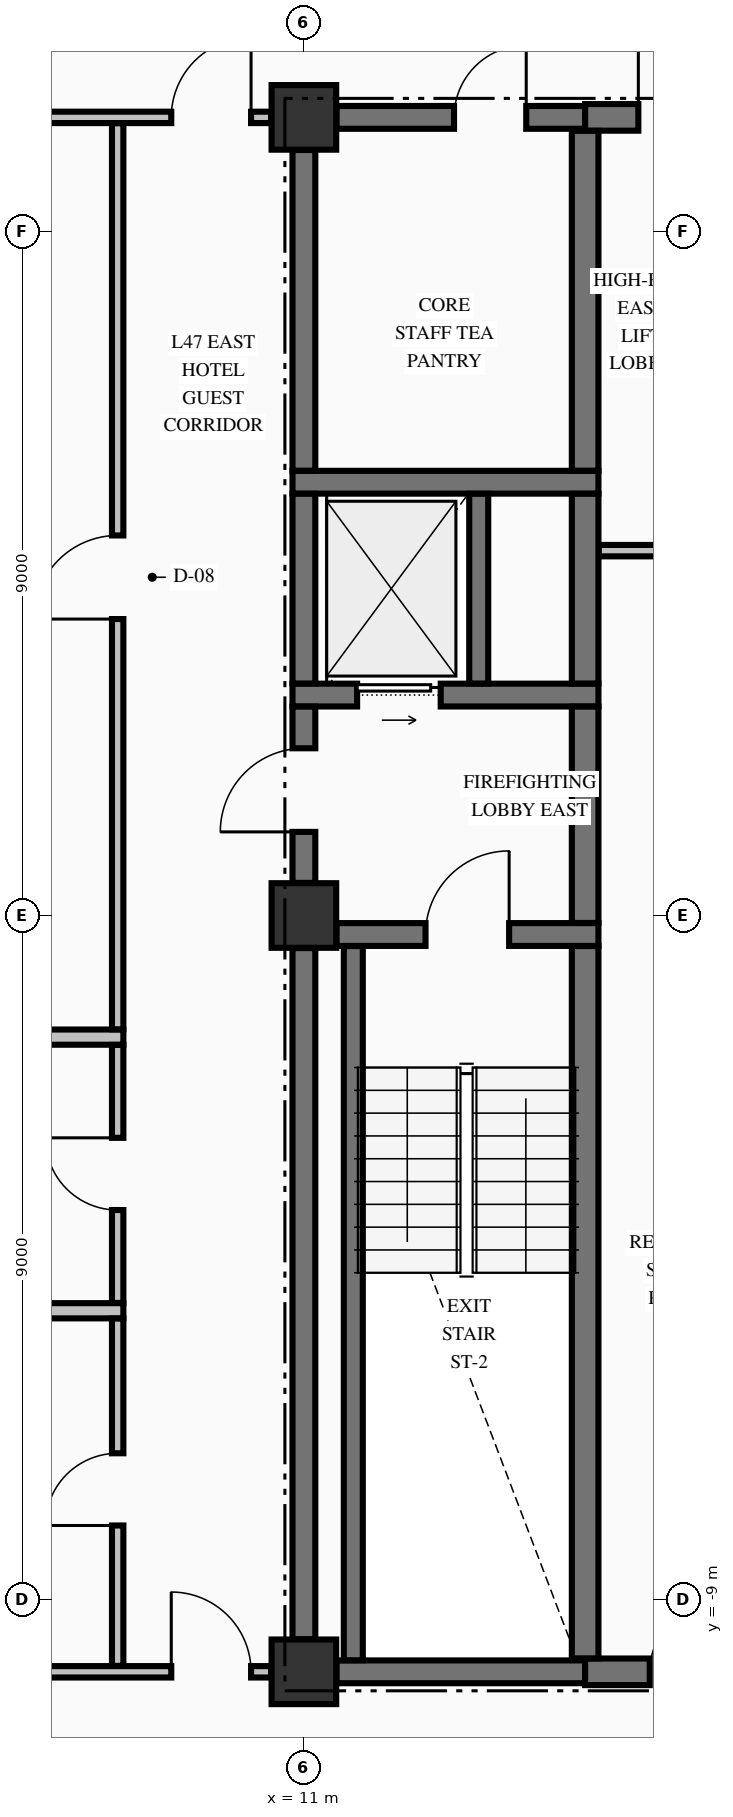
"""IFC4 building model, lengths in metres.
Left out: names, types, materials, properties, quantities, classifications, styles, units other than length and angle.
Written with IfcOpenShell. Run it as: python <this file> out.ifc"""

import sys

from ifc_helpers import new_model, si_unit, direction, frame, frame_2d, origin, origin_2d, place, context, subcontext, project, spatial, rectangle, extrude, element, fill, save


model = new_model("IFC4")
c1 = context("Model", 3, precision=1e-05, world=origin(), true_north=direction((0.0, 1.0)))
c2 = subcontext(c1, "Body", "Model", "MODEL_VIEW")
j1 = project(units=[si_unit("LENGTHUNIT", "METRE"), si_unit("PLANEANGLEUNIT", "RADIAN")], contexts=[c1])
p1 = place(None, origin())
s1 = spatial("IfcSite", under=j1, at=p1, CompositionType="ELEMENT")
p2 = place(p1, origin())
s2 = spatial("IfcBuilding", under=s1, at=p2, CompositionType="ELEMENT")
p3 = place(p2, frame((0.0, 0.0, 183.06)))
s3 = spatial("IfcBuildingStorey", under=s2, at=p3, CompositionType="ELEMENT", Elevation=183.06)
for number, where, z_axis, x_axis in (
    (1, (11.0, -9.95, -0.25), (0.0, 0.0, 1.0), (1.0, 0.0, 0.0)),
    (2, (11.0, 0.0, -0.25), (0.0, 0.0, 1.0), (1.0, 0.0, 0.0)),
    (3, (11.0, 10.5, -0.25), (0.0, 0.0, 1.0), (1.0, 0.0, 0.0)),
):
    element("IfcColumn", number, at=place(p3, frame(where, z_axis=z_axis, x_axis=x_axis)), inside=s3, PredefinedType="COLUMN", context=c2, shape_type="SweptSolid", body=[
        extrude(rectangle(XDim=0.85, YDim=0.85, at=origin_2d()), origin(), (0.0, 0.0, 1.0), 3.225),
    ])
p4 = place(p3, frame((11.429, -9.95, 0.0), z_axis=(0.0, 0.0, 1.0), x_axis=(1.0, 0.0, 0.0)))
e4 = element("IfcWall", 4, at=p4, inside=s3, PredefinedType="SHEAR", context=c2, shape_type="SweptSolid", body=[
    extrude(rectangle(XDim=3.271, YDim=0.3, at=frame_2d((1.635, 0.0))), origin(), (0.0, 0.0, 1.0), 2.975),
])
p5 = place(p3, frame((14.7, -9.95, 0.0), z_axis=(0.0, 0.0, 1.0), x_axis=(1.0, 0.0, 0.0)))
e5 = element("IfcWall", 5, at=p5, inside=s3, PredefinedType="SHEAR", context=c2, shape_type="SweptSolid", body=[
    extrude(rectangle(XDim=4.871, YDim=0.35, at=frame_2d((2.436, 0.0))), origin(), (0.0, 0.0, 1.0), 2.975),
])
p6 = place(p5, frame((0.85, 0.0, 0.0)))
e6 = element("IfcOpeningElement", 6, at=p6, cuts=e5, PredefinedType="OPENING", context=c2, shape_type="SweptSolid", body=[
    extrude(rectangle(XDim=0.9, YDim=2.15, at=frame_2d((0.45, 1.075))), frame((0.0, 0.185, 0.0), z_axis=(0.0, -1.0, 0.0), x_axis=(1.0, 0.0, 0.0)), (0.0, 0.0, 1.0), 0.37),
])
p7 = place(p5, frame((3.4, 0.0, 0.0)))
e7 = element("IfcOpeningElement", 7, at=p7, cuts=e5, PredefinedType="OPENING", context=c2, shape_type="SweptSolid", body=[
    extrude(rectangle(XDim=0.9, YDim=2.15, at=frame_2d((0.45, 1.075))), frame((0.0, 0.185, 0.0), z_axis=(0.0, -1.0, 0.0), x_axis=(1.0, 0.0, 0.0)), (0.0, 0.0, 1.0), 0.37),
])
p8 = place(p3, frame((11.429, -0.25, 0.0), z_axis=(0.0, 0.0, 1.0), x_axis=(1.0, 0.0, 0.0)))
e8 = element("IfcWall", 8, at=p8, inside=s3, PredefinedType="SHEAR", context=c2, shape_type="SweptSolid", body=[
    extrude(rectangle(XDim=3.446, YDim=0.3, at=frame_2d((1.723, 0.0))), origin(), (0.0, 0.0, 1.0), 2.975),
])
p9 = place(p8, frame((1.171, 0.0, 0.0)))
e9 = element("IfcOpeningElement", 9, at=p9, cuts=e8, PredefinedType="OPENING", context=c2, shape_type="SweptSolid", body=[
    extrude(rectangle(XDim=1.1, YDim=2.15, at=frame_2d((0.55, 1.075))), frame((0.0, 0.16, 0.0), z_axis=(0.0, -1.0, 0.0), x_axis=(1.0, 0.0, 0.0)), (0.0, 0.0, 1.0), 0.32),
])
p10 = place(p3, frame((10.85, 2.9, 0.0), z_axis=(0.0, 0.0, 1.0), x_axis=(1.0, 0.0, 0.0)))
e10 = element("IfcWall", 10, at=p10, inside=s3, PredefinedType="SHEAR", context=c2, shape_type="SweptSolid", body=[
    extrude(rectangle(XDim=4.025, YDim=0.3, at=frame_2d((2.012, 0.0))), origin(), (0.0, 0.0, 1.0), 2.975),
])
p11 = place(p10, frame((0.85, 0.0, 0.0)))
e11 = element("IfcOpeningElement", 11, at=p11, cuts=e10, PredefinedType="OPENING", context=c2, shape_type="SweptSolid", body=[
    extrude(rectangle(XDim=1.1, YDim=2.2, at=frame_2d((0.55, 1.1))), frame((0.0, 0.16, 0.0), z_axis=(0.0, -1.0, 0.0), x_axis=(1.0, 0.0, 0.0)), (0.0, 0.0, 1.0), 0.32),
])
p12 = place(p3, frame((10.85, 5.7, 0.0), z_axis=(0.0, 0.0, 1.0), x_axis=(1.0, 0.0, 0.0)))
e12 = element("IfcWall", 12, at=p12, inside=s3, PredefinedType="SHEAR", context=c2, shape_type="SweptSolid", body=[
    extrude(rectangle(XDim=4.025, YDim=0.3, at=frame_2d((2.012, 0.0))), origin(), (0.0, 0.0, 1.0), 2.975),
])
p13 = place(p3, frame((11.429, 10.5, 0.0), z_axis=(0.0, 0.0, 1.0), x_axis=(1.0, 0.0, 0.0)))
e13 = element("IfcWall", 13, at=p13, inside=s3, PredefinedType="SHEAR", context=c2, shape_type="SweptSolid", body=[
    extrude(rectangle(XDim=3.271, YDim=0.3, at=frame_2d((1.635, 0.0))), origin(), (0.0, 0.0, 1.0), 2.975),
])
p14 = place(p13, frame((1.546, 0.0, 0.0)))
e14 = element("IfcOpeningElement", 14, at=p14, cuts=e13, PredefinedType="OPENING", context=c2, shape_type="SweptSolid", body=[
    extrude(rectangle(XDim=0.95, YDim=2.02, at=frame_2d((0.475, 1.01))), frame((0.0, 0.16, 0.0), z_axis=(0.0, -1.0, 0.0), x_axis=(1.0, 0.0, 0.0)), (0.0, 0.0, 1.0), 0.32),
])
p15 = place(p3, frame((14.7, 10.5, 0.0), z_axis=(0.0, 0.0, 1.0), x_axis=(1.0, 0.0, 0.0)))
e15 = element("IfcWall", 15, at=p15, inside=s3, PredefinedType="SHEAR", context=c2, shape_type="SweptSolid", body=[
    extrude(rectangle(XDim=4.871, YDim=0.35, at=frame_2d((2.436, 0.0))), origin(), (0.0, 0.0, 1.0), 2.975),
])
p16 = place(p15, frame((0.7, 0.0, 0.0)))
e16 = element("IfcOpeningElement", 16, at=p16, cuts=e15, PredefinedType="OPENING", context=c2, shape_type="SweptSolid", body=[
    extrude(rectangle(XDim=0.95, YDim=2.02, at=frame_2d((0.475, 1.01))), frame((0.0, 0.185, 0.0), z_axis=(0.0, -1.0, 0.0), x_axis=(1.0, 0.0, 0.0)), (0.0, 0.0, 1.0), 0.37),
])
p17 = place(p3, frame((-10.569, -9.95, 0.0), z_axis=(0.0, 0.0, 1.0), x_axis=(1.0, 0.0, 0.0)))
e17 = element("IfcWall", 17, at=p17, inside=s3, PredefinedType="PARTITIONING", context=c2, shape_type="SweptSolid", body=[
    extrude(rectangle(XDim=21.138, YDim=0.15, at=frame_2d((10.569, 0.0))), origin(), (0.0, 0.0, 1.0), 2.975),
])
p18 = place(p17, frame((0.264, 0.0, 0.0)))
e18 = element("IfcOpeningElement", 18, at=p18, cuts=e17, PredefinedType="OPENING", context=c2, shape_type="SweptSolid", body=[
    extrude(rectangle(XDim=1.05, YDim=2.15, at=frame_2d((0.525, 1.075))), frame((0.0, 0.085, 0.0), z_axis=(0.0, -1.0, 0.0), x_axis=(1.0, 0.0, 0.0)), (0.0, 0.0, 1.0), 0.17),
])
p19 = place(p17, frame((19.824, 0.0, 0.0)))
e19 = element("IfcOpeningElement", 19, at=p19, cuts=e17, PredefinedType="OPENING", context=c2, shape_type="SweptSolid", body=[
    extrude(rectangle(XDim=1.05, YDim=2.15, at=frame_2d((0.525, 1.075))), frame((0.0, 0.085, 0.0), z_axis=(0.0, -1.0, 0.0), x_axis=(1.0, 0.0, 0.0)), (0.0, 0.0, 1.0), 0.17),
])
p20 = place(p17, frame((12.874, 0.0, 0.0)))
e20 = element("IfcOpeningElement", 20, at=p20, cuts=e17, PredefinedType="OPENING", context=c2, shape_type="SweptSolid", body=[
    extrude(rectangle(XDim=0.95, YDim=2.15, at=frame_2d((0.475, 1.075))), frame((0.0, 0.085, 0.0), z_axis=(0.0, -1.0, 0.0), x_axis=(1.0, 0.0, 0.0)), (0.0, 0.0, 1.0), 0.17),
])
for number, where, z_axis, x_axis in (
    (21, (-0.1, -5.2, 0.0), (0.0, 0.0, 1.0), (1.0, 0.0, 0.0)),
    (22, (-0.1, -1.6, 0.0), (0.0, 0.0, 1.0), (1.0, 0.0, 0.0)),
):
    element("IfcWall", number, at=place(p3, frame(where, z_axis=z_axis, x_axis=x_axis)), inside=s3, PredefinedType="PARTITIONING", context=c2, shape_type="SweptSolid", body=[
        extrude(rectangle(XDim=8.725, YDim=0.2, at=frame_2d((4.363, 0.0))), origin(), (0.0, 0.0, 1.0), 2.975),
    ])
p21 = place(p3, frame((14.878, 4.8, 0.0), z_axis=(0.0, 0.0, 1.0), x_axis=(1.0, 0.0, 0.0)))
e23 = element("IfcWall", 23, at=p21, inside=s3, PredefinedType="PARTITIONING", context=c2, shape_type="SweptSolid", body=[
    extrude(rectangle(XDim=4.944, YDim=0.15, at=frame_2d((2.472, 0.0))), origin(), (0.0, 0.0, 1.0), 2.975),
])
p22 = place(p3, frame((-10.569, 10.5, 0.0), z_axis=(0.0, 0.0, 1.0), x_axis=(1.0, 0.0, 0.0)))
e24 = element("IfcWall", 24, at=p22, inside=s3, PredefinedType="PARTITIONING", context=c2, shape_type="SweptSolid", body=[
    extrude(rectangle(XDim=21.138, YDim=0.15, at=frame_2d((10.569, 0.0))), origin(), (0.0, 0.0, 1.0), 2.975),
])
p23 = place(p22, frame((0.264, 0.0, 0.0)))
e25 = element("IfcOpeningElement", 25, at=p23, cuts=e24, PredefinedType="OPENING", context=c2, shape_type="SweptSolid", body=[
    extrude(rectangle(XDim=1.05, YDim=2.15, at=frame_2d((0.525, 1.075))), frame((0.0, 0.085, 0.0), z_axis=(0.0, -1.0, 0.0), x_axis=(1.0, 0.0, 0.0)), (0.0, 0.0, 1.0), 0.17),
])
p24 = place(p22, frame((19.824, 0.0, 0.0)))
e26 = element("IfcOpeningElement", 26, at=p24, cuts=e24, PredefinedType="OPENING", context=c2, shape_type="SweptSolid", body=[
    extrude(rectangle(XDim=1.05, YDim=2.15, at=frame_2d((0.525, 1.075))), frame((0.0, 0.085, 0.0), z_axis=(0.0, -1.0, 0.0), x_axis=(1.0, 0.0, 0.0)), (0.0, 0.0, 1.0), 0.17),
])
p25 = place(p3, frame((11.0, -9.521, 0.0), z_axis=(0.0, 0.0, 1.0), x_axis=(0.0, 1.0, 0.0)))
e27 = element("IfcWall", 27, at=p25, inside=s3, PredefinedType="SHEAR", context=c2, shape_type="SweptSolid", body=[
    extrude(rectangle(XDim=9.092, YDim=0.3, at=frame_2d((4.546, 0.0))), origin(), (0.0, 0.0, 1.0), 2.975),
])
p26 = place(p3, frame((11.0, 0.429, 0.0), z_axis=(0.0, 0.0, 1.0), x_axis=(0.0, 1.0, 0.0)))
e28 = element("IfcWall", 28, at=p26, inside=s3, PredefinedType="SHEAR", context=c2, shape_type="SweptSolid", body=[
    extrude(rectangle(XDim=2.319, YDim=0.3, at=frame_2d((1.16, 0.0))), origin(), (0.0, 0.0, 1.0), 2.975),
])
p27 = place(p26, frame((0.671, 0.0, 0.0)))
e29 = element("IfcOpeningElement", 29, at=p27, cuts=e28, PredefinedType="OPENING", context=c2, shape_type="SweptSolid", body=[
    extrude(rectangle(XDim=1.1, YDim=2.15, at=frame_2d((0.55, 1.075))), frame((0.0, 0.16, 0.0), z_axis=(0.0, -1.0, 0.0), x_axis=(1.0, 0.0, 0.0)), (0.0, 0.0, 1.0), 0.32),
])
p28 = place(p3, frame((11.0, 3.052, 0.0), z_axis=(0.0, 0.0, 1.0), x_axis=(0.0, 1.0, 0.0)))
e30 = element("IfcWall", 30, at=p28, inside=s3, PredefinedType="SHEAR", context=c2, shape_type="SweptSolid", body=[
    extrude(rectangle(XDim=2.496, YDim=0.3, at=frame_2d((1.248, 0.0))), origin(), (0.0, 0.0, 1.0), 2.975),
])
p29 = place(p3, frame((11.0, 5.852, 0.0), z_axis=(0.0, 0.0, 1.0), x_axis=(0.0, 1.0, 0.0)))
e31 = element("IfcWall", 31, at=p29, inside=s3, PredefinedType="SHEAR", context=c2, shape_type="SweptSolid", body=[
    extrude(rectangle(XDim=4.219, YDim=0.3, at=frame_2d((2.109, 0.0))), origin(), (0.0, 0.0, 1.0), 2.975),
])
p30 = place(p3, frame((11.65, -9.798, 0.0), z_axis=(0.0, 0.0, 1.0), x_axis=(0.0, 1.0, 0.0)))
e32 = element("IfcWall", 32, at=p30, inside=s3, PredefinedType="SOLIDWALL", context=c2, shape_type="SweptSolid", body=[
    extrude(rectangle(XDim=9.396, YDim=0.25, at=frame_2d((4.698, 0.0))), origin(), (0.0, 0.0, 1.0), 2.975),
])
p31 = place(p3, frame((13.3, 3.052, 0.0), z_axis=(0.0, 0.0, 1.0), x_axis=(0.0, 1.0, 0.0)))
e33 = element("IfcWall", 33, at=p31, inside=s3, PredefinedType="SOLIDWALL", context=c2, shape_type="SweptSolid", body=[
    extrude(rectangle(XDim=2.496, YDim=0.25, at=frame_2d((1.248, 0.0))), origin(), (0.0, 0.0, 1.0), 2.975),
])
p32 = place(p3, frame((14.7, -9.773, 0.0), z_axis=(0.0, 0.0, 1.0), x_axis=(0.0, 1.0, 0.0)))
e34 = element("IfcWall", 34, at=p32, inside=s3, PredefinedType="SHEAR", context=c2, shape_type="SweptSolid", body=[
    extrude(rectangle(XDim=9.371, YDim=0.35, at=frame_2d((4.686, 0.0))), origin(), (0.0, 0.0, 1.0), 2.975),
])
p33 = place(p3, frame((14.7, -0.098, 0.0), z_axis=(0.0, 0.0, 1.0), x_axis=(0.0, 1.0, 0.0)))
e35 = element("IfcWall", 35, at=p33, inside=s3, PredefinedType="SHEAR", context=c2, shape_type="SweptSolid", body=[
    extrude(rectangle(XDim=2.846, YDim=0.35, at=frame_2d((1.423, 0.0))), origin(), (0.0, 0.0, 1.0), 2.975),
])
p34 = place(p3, frame((14.7, 3.052, 0.0), z_axis=(0.0, 0.0, 1.0), x_axis=(0.0, 1.0, 0.0)))
e36 = element("IfcWall", 36, at=p34, inside=s3, PredefinedType="SHEAR", context=c2, shape_type="SweptSolid", body=[
    extrude(rectangle(XDim=2.496, YDim=0.35, at=frame_2d((1.248, 0.0))), origin(), (0.0, 0.0, 1.0), 2.975),
])
p35 = place(p3, frame((14.7, 5.852, 0.0), z_axis=(0.0, 0.0, 1.0), x_axis=(0.0, 1.0, 0.0)))
e37 = element("IfcWall", 37, at=p35, inside=s3, PredefinedType="SHEAR", context=c2, shape_type="SweptSolid", body=[
    extrude(rectangle(XDim=4.471, YDim=0.35, at=frame_2d((2.235, 0.0))), origin(), (0.0, 0.0, 1.0), 2.975),
])
p36 = place(p3, frame((8.55, -9.872, 0.0), z_axis=(0.0, 0.0, 1.0), x_axis=(0.0, 1.0, 0.0)))
e38 = element("IfcWall", 38, at=p36, inside=s3, PredefinedType="PARTITIONING", context=c2, shape_type="SweptSolid", body=[
    extrude(rectangle(XDim=4.569, YDim=0.15, at=frame_2d((2.285, 0.0))), origin(), (0.0, 0.0, 1.0), 2.975),
])
p37 = place(p36, frame((1.847, 0.0, 0.0)))
e39 = element("IfcOpeningElement", 39, at=p37, cuts=e38, PredefinedType="OPENING", context=c2, shape_type="SweptSolid", body=[
    extrude(rectangle(XDim=0.95, YDim=2.15, at=frame_2d((0.475, 1.075))), frame((0.0, 0.085, 0.0), z_axis=(0.0, -1.0, 0.0), x_axis=(1.0, 0.0, 0.0)), (0.0, 0.0, 1.0), 0.17),
])
p38 = place(p3, frame((8.55, -5.097, 0.0), z_axis=(0.0, 0.0, 1.0), x_axis=(0.0, 1.0, 0.0)))
e40 = element("IfcWall", 40, at=p38, inside=s3, PredefinedType="PARTITIONING", context=c2, shape_type="SweptSolid", body=[
    extrude(rectangle(XDim=3.394, YDim=0.15, at=frame_2d((1.697, 0.0))), origin(), (0.0, 0.0, 1.0), 2.975),
])
p39 = place(p38, frame((1.222, 0.0, 0.0)))
e41 = element("IfcOpeningElement", 41, at=p39, cuts=e40, PredefinedType="OPENING", context=c2, shape_type="SweptSolid", body=[
    extrude(rectangle(XDim=0.95, YDim=2.15, at=frame_2d((0.475, 1.075))), frame((0.0, 0.085, 0.0), z_axis=(0.0, -1.0, 0.0), x_axis=(1.0, 0.0, 0.0)), (0.0, 0.0, 1.0), 0.17),
])
p40 = place(p3, frame((8.55, -1.497, 0.0), z_axis=(0.0, 0.0, 1.0), x_axis=(0.0, 1.0, 0.0)))
e42 = element("IfcWall", 42, at=p40, inside=s3, PredefinedType="PARTITIONING", context=c2, shape_type="SweptSolid", body=[
    extrude(rectangle(XDim=11.919, YDim=0.15, at=frame_2d((5.959, 0.0))), origin(), (0.0, 0.0, 1.0), 2.975),
])
p41 = place(p40, frame((5.397, 0.0, 0.0)))
e43 = element("IfcOpeningElement", 43, at=p41, cuts=e42, PredefinedType="OPENING", context=c2, shape_type="SweptSolid", body=[
    extrude(rectangle(XDim=1.1, YDim=2.15, at=frame_2d((0.55, 1.075))), frame((0.0, 0.085, 0.0), z_axis=(0.0, -1.0, 0.0), x_axis=(1.0, 0.0, 0.0)), (0.0, 0.0, 1.0), 0.17),
])
p42 = place(p9, origin())
e44 = element("IfcDoor", 44, at=p42, inside=s3, OperationType="SINGLE_SWING_RIGHT", PredefinedType="DOOR", context=c2, shape_type="SweptSolid", body=[
    extrude(rectangle(XDim=1.1, YDim=2.15, at=frame_2d((0.55, 1.075))), frame((0.0, 0.025, 0.0), z_axis=(0.0, -1.0, 0.0), x_axis=(1.0, 0.0, 0.0)), (0.0, 0.0, 1.0), 0.05),
])
fill(e9, e44)
p43 = place(p27, origin())
e45 = element("IfcDoor", 45, at=p43, inside=s3, OperationType="SINGLE_SWING_LEFT", PredefinedType="DOOR", context=c2, shape_type="SweptSolid", body=[
    extrude(rectangle(XDim=1.1, YDim=2.15, at=frame_2d((0.55, 1.075))), frame((0.0, 0.025, 0.0), z_axis=(0.0, -1.0, 0.0), x_axis=(1.0, 0.0, 0.0)), (0.0, 0.0, 1.0), 0.05),
])
fill(e29, e45)
p44 = place(p11, origin())
e46 = element("IfcDoor", 46, at=p44, inside=s3, OperationType="SLIDING_TO_RIGHT", PredefinedType="DOOR", context=c2, shape_type="SweptSolid", body=[
    extrude(rectangle(XDim=1.1, YDim=2.2, at=frame_2d((0.55, 1.1))), frame((0.0, 0.025, 0.0), z_axis=(0.0, -1.0, 0.0), x_axis=(1.0, 0.0, 0.0)), (0.0, 0.0, 1.0), 0.05),
])
fill(e11, e46)
p45 = place(p14, origin())
e47 = element("IfcDoor", 47, at=p45, inside=s3, OperationType="SINGLE_SWING_RIGHT", PredefinedType="DOOR", context=c2, shape_type="SweptSolid", body=[
    extrude(rectangle(XDim=0.95, YDim=2.02, at=frame_2d((0.475, 1.01))), frame((0.0, 0.025, 0.0), z_axis=(0.0, -1.0, 0.0), x_axis=(1.0, 0.0, 0.0)), (0.0, 0.0, 1.0), 0.05),
])
fill(e14, e47)
p46 = place(p16, origin())
e48 = element("IfcDoor", 48, at=p46, inside=s3, OperationType="SINGLE_SWING_LEFT", PredefinedType="DOOR", context=c2, shape_type="SweptSolid", body=[
    extrude(rectangle(XDim=0.95, YDim=2.02, at=frame_2d((0.475, 1.01))), frame((0.0, 0.025, 0.0), z_axis=(0.0, -1.0, 0.0), x_axis=(1.0, 0.0, 0.0)), (0.0, 0.0, 1.0), 0.05),
])
fill(e16, e48)
p47 = place(p6, origin())
e49 = element("IfcDoor", 49, at=p47, inside=s3, OperationType="SINGLE_SWING_RIGHT", PredefinedType="DOOR", context=c2, shape_type="SweptSolid", body=[
    extrude(rectangle(XDim=0.9, YDim=2.15, at=frame_2d((0.45, 1.075))), frame((0.0, 0.025, 0.0), z_axis=(0.0, -1.0, 0.0), x_axis=(1.0, 0.0, 0.0)), (0.0, 0.0, 1.0), 0.05),
])
fill(e6, e49)
p48 = place(p24, origin())
e50 = element("IfcDoor", 50, at=p48, inside=s3, OperationType="SINGLE_SWING_RIGHT", PredefinedType="DOOR", context=c2, shape_type="SweptSolid", body=[
    extrude(rectangle(XDim=1.05, YDim=2.15, at=frame_2d((0.525, 1.075))), frame((0.0, 0.025, 0.0), z_axis=(0.0, -1.0, 0.0), x_axis=(1.0, 0.0, 0.0)), (0.0, 0.0, 1.0), 0.05),
])
fill(e26, e50)
p49 = place(p19, origin())
e51 = element("IfcDoor", 51, at=p49, inside=s3, OperationType="SINGLE_SWING_LEFT", PredefinedType="DOOR", context=c2, shape_type="SweptSolid", body=[
    extrude(rectangle(XDim=1.05, YDim=2.15, at=frame_2d((0.525, 1.075))), frame((0.0, 0.025, 0.0), z_axis=(0.0, -1.0, 0.0), x_axis=(1.0, 0.0, 0.0)), (0.0, 0.0, 1.0), 0.05),
])
fill(e19, e51)
p50 = place(p41, origin())
e52 = element("IfcDoor", 52, at=p50, inside=s3, OperationType="SINGLE_SWING_LEFT", PredefinedType="DOOR", context=c2, shape_type="SweptSolid", body=[
    extrude(rectangle(XDim=1.1, YDim=2.15, at=frame_2d((0.55, 1.075))), frame((0.0, 0.025, 0.0), z_axis=(0.0, -1.0, 0.0), x_axis=(1.0, 0.0, 0.0)), (0.0, 0.0, 1.0), 0.05),
])
fill(e43, e52)
p51 = place(p39, origin())
e53 = element("IfcDoor", 53, at=p51, inside=s3, OperationType="SINGLE_SWING_RIGHT", PredefinedType="DOOR", context=c2, shape_type="SweptSolid", body=[
    extrude(rectangle(XDim=0.95, YDim=2.15, at=frame_2d((0.475, 1.075))), frame((0.0, 0.025, 0.0), z_axis=(0.0, -1.0, 0.0), x_axis=(1.0, 0.0, 0.0)), (0.0, 0.0, 1.0), 0.05),
])
fill(e41, e53)
p52 = place(p37, origin())
e54 = element("IfcDoor", 54, at=p52, inside=s3, OperationType="SINGLE_SWING_LEFT", PredefinedType="DOOR", context=c2, shape_type="SweptSolid", body=[
    extrude(rectangle(XDim=0.95, YDim=2.15, at=frame_2d((0.475, 1.075))), frame((0.0, 0.025, 0.0), z_axis=(0.0, -1.0, 0.0), x_axis=(1.0, 0.0, 0.0)), (0.0, 0.0, 1.0), 0.05),
])
fill(e39, e54)
save(model, sys.argv[1])
